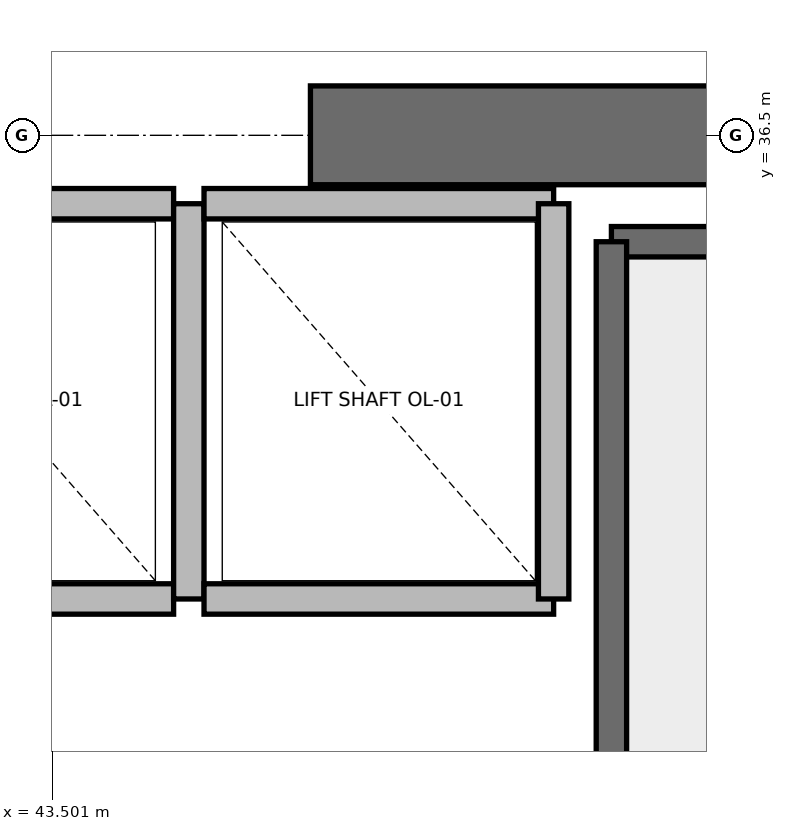
"""IFC4 building model, lengths in metres.
Left out: names, types, materials, properties, quantities, classifications, styles, units other than length and angle.
Written with IfcOpenShell. Run it as: python <this file> out.ifc"""

import sys

from ifc_helpers import new_model, si_unit, direction, frame, frame_2d, origin, place, context, subcontext, project, spatial, rectangle, extrude, element, save


model = new_model("IFC4")
c1 = context("Model", 3, precision=1e-05, world=origin(), true_north=direction((0.0, 1.0)))
c2 = subcontext(c1, "Body", "Model", "MODEL_VIEW")
j1 = project(units=[si_unit("LENGTHUNIT", "METRE"), si_unit("PLANEANGLEUNIT", "RADIAN")], contexts=[c1])
p1 = place(None, origin())
s1 = spatial("IfcSite", under=j1, at=p1, CompositionType="ELEMENT")
p2 = place(p1, origin())
s2 = spatial("IfcBuilding", under=s1, at=p2, CompositionType="ELEMENT")
p3 = place(p2, frame((0.0, 0.0, 87.6)))
s3 = spatial("IfcBuildingStorey", under=s2, at=p3, CompositionType="ELEMENT", Elevation=87.6)
p4 = place(p3, frame((45.2, 36.5, 0.0), z_axis=(0.0, 0.0, 1.0), x_axis=(1.0, 0.0, 0.0)))
e1 = element("IfcWall", 1, at=p4, inside=s3, PredefinedType="SHEAR", context=c2, shape_type="SweptSolid", body=[
    extrude(rectangle(XDim=5.8, YDim=0.65, at=frame_2d((2.9, 0.0))), origin(), (0.0, 0.0, 1.0), 3.76),
])
p5 = place(p3, frame((47.18, 35.8, 0.0), z_axis=(0.0, 0.0, 1.0), x_axis=(1.0, 0.0, 0.0)))
e2 = element("IfcWall", 2, at=p5, inside=s3, PredefinedType="SOLIDWALL", context=c2, shape_type="SweptSolid", body=[
    extrude(rectangle(XDim=3.12, YDim=0.2, at=frame_2d((1.56, 0.0))), origin(), (0.0, 0.0, 1.0), 3.76),
])
p6 = place(p3, frame((47.18, 27.62, 0.0), z_axis=(0.0, 0.0, 1.0), x_axis=(0.0, 1.0, 0.0)))
e3 = element("IfcWall", 3, at=p6, inside=s3, PredefinedType="SOLIDWALL", context=c2, shape_type="SweptSolid", body=[
    extrude(rectangle(XDim=8.18, YDim=0.2, at=frame_2d((4.09, 0.0))), origin(), (0.0, 0.0, 1.0), 3.76),
])
p7 = place(p3, frame((42.0, 33.45, 0.0), z_axis=(0.0, 0.0, 1.0), x_axis=(1.0, 0.0, 0.0)))
e4 = element("IfcWall", 4, at=p7, inside=s3, PredefinedType="SOLIDWALL", context=c2, shape_type="SweptSolid", body=[
    extrude(rectangle(XDim=2.3, YDim=0.2, at=frame_2d((1.15, 0.0))), origin(), (0.0, 0.0, 1.0), 3.76),
])
p8 = place(p3, frame((44.3, 36.05, 0.0), z_axis=(0.0, 0.0, 1.0), x_axis=(-1.0, 0.0, 0.0)))
e5 = element("IfcWall", 5, at=p8, inside=s3, PredefinedType="SOLIDWALL", context=c2, shape_type="SweptSolid", body=[
    extrude(rectangle(XDim=2.3, YDim=0.2, at=frame_2d((1.15, 0.0))), origin(), (0.0, 0.0, 1.0), 2.54),
])
p9 = place(p3, frame((44.4, 33.45, 0.0), z_axis=(0.0, 0.0, 1.0), x_axis=(0.0, 1.0, 0.0)))
e6 = element("IfcWall", 6, at=p9, inside=s3, PredefinedType="SOLIDWALL", context=c2, shape_type="SweptSolid", body=[
    extrude(rectangle(XDim=2.6, YDim=0.2, at=frame_2d((1.3, 0.0))), origin(), (0.0, 0.0, 1.0), 2.54),
])
p10 = place(p3, frame((44.5, 33.45, 0.0), z_axis=(0.0, 0.0, 1.0), x_axis=(1.0, 0.0, 0.0)))
e7 = element("IfcWall", 7, at=p10, inside=s3, PredefinedType="SOLIDWALL", context=c2, shape_type="SweptSolid", body=[
    extrude(rectangle(XDim=2.3, YDim=0.2, at=frame_2d((1.15, 0.0))), origin(), (0.0, 0.0, 1.0), 3.76),
])
p11 = place(p3, frame((46.8, 36.05, 0.0), z_axis=(0.0, 0.0, 1.0), x_axis=(-1.0, 0.0, 0.0)))
e8 = element("IfcWall", 8, at=p11, inside=s3, PredefinedType="SOLIDWALL", context=c2, shape_type="SweptSolid", body=[
    extrude(rectangle(XDim=2.3, YDim=0.2, at=frame_2d((1.15, 0.0))), origin(), (0.0, 0.0, 1.0), 2.54),
])
p12 = place(p3, frame((46.8, 33.45, 0.0), z_axis=(0.0, 0.0, 1.0), x_axis=(0.0, 1.0, 0.0)))
e9 = element("IfcWall", 9, at=p12, inside=s3, PredefinedType="SOLIDWALL", context=c2, shape_type="SweptSolid", body=[
    extrude(rectangle(XDim=2.6, YDim=0.2, at=frame_2d((1.3, 0.0))), origin(), (0.0, 0.0, 1.0), 3.76),
])
save(model, sys.argv[1])
